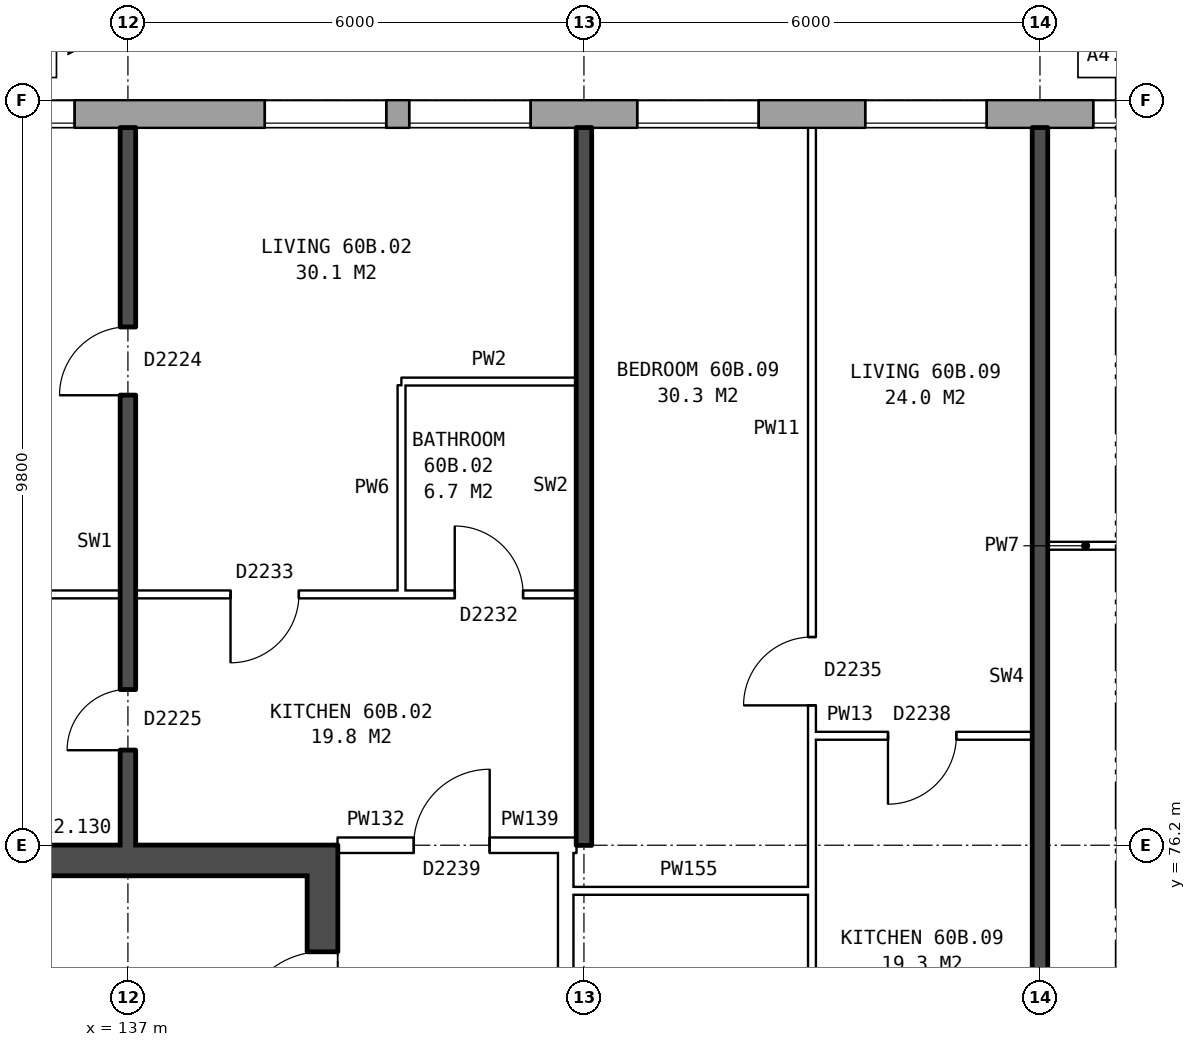
"""IFC4 building model, lengths in metres.
Left out: names, types, materials, properties, quantities, classifications, styles, units other than length and angle.
Written with IfcOpenShell. Run it as: python <this file> out.ifc"""

import sys

from ifc_helpers import new_model, si_unit, direction, frame, frame_2d, origin, place, context, subcontext, project, spatial, rectangle, extrude, element, fill, save


model = new_model("IFC4")
c1 = context("Model", 3, precision=1e-05, world=origin(), true_north=direction((0.0, 1.0)))
c2 = subcontext(c1, "Body", "Model", "MODEL_VIEW")
j1 = project(units=[si_unit("LENGTHUNIT", "METRE"), si_unit("PLANEANGLEUNIT", "RADIAN")], contexts=[c1])
p1 = place(None, origin())
s1 = spatial("IfcSite", under=j1, at=p1, CompositionType="ELEMENT")
p2 = place(p1, origin())
s2 = spatial("IfcBuilding", under=s1, at=p2, CompositionType="ELEMENT")
p3 = place(p2, frame((0.0, 0.0, 212.1)))
s3 = spatial("IfcBuildingStorey", under=s2, at=p3, CompositionType="ELEMENT", Elevation=212.1)
p4 = place(p3, frame((165.925, 85.82, 0.0), z_axis=(0.0, 0.0, 1.0), x_axis=(-1.0, 0.0, 0.0)))
e1 = element("IfcWall", 1, at=p4, inside=s3, PredefinedType="STANDARD", context=c2, shape_type="SweptSolid", body=[
    extrude(rectangle(XDim=33.875, YDim=0.36, at=frame_2d((16.938, 0.0))), origin(), (0.0, 0.0, 1.0), 2.85),
])
p5 = place(p4, frame((0.3, 0.0, 0.8)))
e2 = element("IfcOpeningElement", 2, at=p5, cuts=e1, PredefinedType="OPENING", context=c2, shape_type="SweptSolid", body=[
    extrude(rectangle(XDim=0.6, YDim=1.8, at=frame_2d((0.3, 0.9))), frame((0.0, 0.19, 0.0), z_axis=(0.0, -1.0, 0.0), x_axis=(1.0, 0.0, 0.0)), (0.0, 0.0, 1.0), 0.38),
])
p6 = place(p4, frame((5.625, 0.0, 0.8)))
e3 = element("IfcOpeningElement", 3, at=p6, cuts=e1, PredefinedType="OPENING", context=c2, shape_type="SweptSolid", body=[
    extrude(rectangle(XDim=1.6, YDim=1.8, at=frame_2d((0.8, 0.9))), frame((0.0, 0.19, 0.0), z_axis=(0.0, -1.0, 0.0), x_axis=(1.0, 0.0, 0.0)), (0.0, 0.0, 1.0), 0.38),
])
p7 = place(p4, frame((8.625, 0.0, 0.8)))
e4 = element("IfcOpeningElement", 4, at=p7, cuts=e1, PredefinedType="OPENING", context=c2, shape_type="SweptSolid", body=[
    extrude(rectangle(XDim=1.6, YDim=1.8, at=frame_2d((0.8, 0.9))), frame((0.0, 0.19, 0.0), z_axis=(0.0, -1.0, 0.0), x_axis=(1.0, 0.0, 0.0)), (0.0, 0.0, 1.0), 0.38),
])
p8 = place(p4, frame((11.625, 0.0, 0.8)))
e5 = element("IfcOpeningElement", 5, at=p8, cuts=e1, PredefinedType="OPENING", context=c2, shape_type="SweptSolid", body=[
    extrude(rectangle(XDim=1.6, YDim=1.8, at=frame_2d((0.8, 0.9))), frame((0.0, 0.19, 0.0), z_axis=(0.0, -1.0, 0.0), x_axis=(1.0, 0.0, 0.0)), (0.0, 0.0, 1.0), 0.38),
])
p9 = place(p4, frame((14.625, 0.0, 0.8)))
e6 = element("IfcOpeningElement", 6, at=p9, cuts=e1, PredefinedType="OPENING", context=c2, shape_type="SweptSolid", body=[
    extrude(rectangle(XDim=1.6, YDim=1.8, at=frame_2d((0.8, 0.9))), frame((0.0, 0.19, 0.0), z_axis=(0.0, -1.0, 0.0), x_axis=(1.0, 0.0, 0.0)), (0.0, 0.0, 1.0), 0.38),
])
p10 = place(p4, frame((17.625, 0.0, 0.8)))
e7 = element("IfcOpeningElement", 7, at=p10, cuts=e1, PredefinedType="OPENING", context=c2, shape_type="SweptSolid", body=[
    extrude(rectangle(XDim=1.6, YDim=1.8, at=frame_2d((0.8, 0.9))), frame((0.0, 0.19, 0.0), z_axis=(0.0, -1.0, 0.0), x_axis=(1.0, 0.0, 0.0)), (0.0, 0.0, 1.0), 0.38),
])
p11 = place(p4, frame((20.625, 0.0, 0.8)))
e8 = element("IfcOpeningElement", 8, at=p11, cuts=e1, PredefinedType="OPENING", context=c2, shape_type="SweptSolid", body=[
    extrude(rectangle(XDim=1.6, YDim=1.8, at=frame_2d((0.8, 0.9))), frame((0.0, 0.19, 0.0), z_axis=(0.0, -1.0, 0.0), x_axis=(1.0, 0.0, 0.0)), (0.0, 0.0, 1.0), 0.38),
])
p12 = place(p4, frame((23.625, 0.0, 0.8)))
e9 = element("IfcOpeningElement", 9, at=p12, cuts=e1, PredefinedType="OPENING", context=c2, shape_type="SweptSolid", body=[
    extrude(rectangle(XDim=1.6, YDim=1.8, at=frame_2d((0.8, 0.9))), frame((0.0, 0.19, 0.0), z_axis=(0.0, -1.0, 0.0), x_axis=(1.0, 0.0, 0.0)), (0.0, 0.0, 1.0), 0.38),
])
p13 = place(p4, frame((25.525, 0.0, 0.8)))
e10 = element("IfcOpeningElement", 10, at=p13, cuts=e1, PredefinedType="OPENING", context=c2, shape_type="SweptSolid", body=[
    extrude(rectangle(XDim=1.6, YDim=1.8, at=frame_2d((0.8, 0.9))), frame((0.0, 0.19, 0.0), z_axis=(0.0, -1.0, 0.0), x_axis=(1.0, 0.0, 0.0)), (0.0, 0.0, 1.0), 0.38),
])
p14 = place(p4, frame((29.625, 0.0, 0.8)))
e11 = element("IfcOpeningElement", 11, at=p14, cuts=e1, PredefinedType="OPENING", context=c2, shape_type="SweptSolid", body=[
    extrude(rectangle(XDim=1.6, YDim=1.8, at=frame_2d((0.8, 0.9))), frame((0.0, 0.19, 0.0), z_axis=(0.0, -1.0, 0.0), x_axis=(1.0, 0.0, 0.0)), (0.0, 0.0, 1.0), 0.38),
])
p15 = place(p4, frame((1.2, 0.0, 1.1)))
e12 = element("IfcOpeningElement", 12, at=p15, cuts=e1, PredefinedType="OPENING", context=c2, shape_type="SweptSolid", body=[
    extrude(rectangle(XDim=1.4, YDim=1.5, at=frame_2d((0.7, 0.75))), frame((0.0, 0.19, 0.0), z_axis=(0.0, -1.0, 0.0), x_axis=(1.0, 0.0, 0.0)), (0.0, 0.0, 1.0), 0.38),
])
p16 = place(p4, frame((4.05, 0.0, 0.8)))
e13 = element("IfcOpeningElement", 13, at=p16, cuts=e1, PredefinedType="OPENING", context=c2, shape_type="SweptSolid", body=[
    extrude(rectangle(XDim=0.6, YDim=0.9, at=frame_2d((0.3, 0.45))), frame((0.0, 0.19, 0.0), z_axis=(0.0, -1.0, 0.0), x_axis=(1.0, 0.0, 0.0)), (0.0, 0.0, 1.0), 0.38),
])
p17 = place(p3, frame((139.56, 63.8, 0.0), z_axis=(0.0, 0.0, 1.0), x_axis=(0.0, 1.0, 0.0)))
e14 = element("IfcWall", 14, at=p17, inside=s3, PredefinedType="SHEAR", context=c2, shape_type="SweptSolid", body=[
    extrude(rectangle(XDim=12.4, YDim=0.4, at=frame_2d((6.2, 0.0))), origin(), (0.0, 0.0, 1.0), 2.85),
])
p18 = place(p17, frame((1.325, 0.0, 0.0)))
e15 = element("IfcOpeningElement", 15, at=p18, cuts=e14, PredefinedType="OPENING", context=c2, shape_type="SweptSolid", body=[
    extrude(rectangle(XDim=1.1, YDim=2.1, at=frame_2d((0.55, 1.05))), frame((0.0, 0.21, 0.0), z_axis=(0.0, -1.0, 0.0), x_axis=(1.0, 0.0, 0.0)), (0.0, 0.0, 1.0), 0.42),
])
p19 = place(p17, frame((3.6, 0.0, 0.0)))
e16 = element("IfcOpeningElement", 16, at=p19, cuts=e14, PredefinedType="OPENING", context=c2, shape_type="SweptSolid", body=[
    extrude(rectangle(XDim=1.1, YDim=2.1, at=frame_2d((0.55, 1.05))), frame((0.0, 0.21, 0.0), z_axis=(0.0, -1.0, 0.0), x_axis=(1.0, 0.0, 0.0)), (0.0, 0.0, 1.0), 0.42),
])
p20 = place(p17, frame((5.8, 0.0, 0.0)))
e17 = element("IfcOpeningElement", 17, at=p20, cuts=e14, PredefinedType="OPENING", context=c2, shape_type="SweptSolid", body=[
    extrude(rectangle(XDim=1.1, YDim=2.1, at=frame_2d((0.55, 1.05))), frame((0.0, 0.21, 0.0), z_axis=(0.0, -1.0, 0.0), x_axis=(1.0, 0.0, 0.0)), (0.0, 0.0, 1.0), 0.42),
])
p21 = place(p17, frame((9.9, 0.0, 0.0)))
e18 = element("IfcOpeningElement", 18, at=p21, cuts=e14, PredefinedType="OPENING", context=c2, shape_type="SweptSolid", body=[
    extrude(rectangle(XDim=1.1, YDim=2.1, at=frame_2d((0.55, 1.05))), frame((0.0, 0.21, 0.0), z_axis=(0.0, -1.0, 0.0), x_axis=(1.0, 0.0, 0.0)), (0.0, 0.0, 1.0), 0.42),
])
p22 = place(p17, frame((8.125, 0.0, 0.0)))
e19 = element("IfcOpeningElement", 19, at=p22, cuts=e14, PredefinedType="OPENING", context=c2, shape_type="SweptSolid", body=[
    extrude(rectangle(XDim=0.85, YDim=2.1, at=frame_2d((0.425, 1.05))), frame((0.0, 0.21, 0.0), z_axis=(0.0, -1.0, 0.0), x_axis=(1.0, 0.0, 0.0)), (0.0, 0.0, 1.0), 0.42),
])
p23 = place(p3, frame((139.36, 76.0, 0.0), z_axis=(0.0, 0.0, 1.0), x_axis=(-1.0, 0.0, 0.0)))
e20 = element("IfcWall", 20, at=p23, inside=s3, PredefinedType="SHEAR", context=c2, shape_type="SweptSolid", body=[
    extrude(rectangle(XDim=7.6, YDim=0.4, at=frame_2d((3.8, 0.0))), origin(), (0.0, 0.0, 1.0), 2.85),
])
p24 = place(p3, frame((142.76, 63.9, 0.0), z_axis=(0.0, 0.0, 1.0), x_axis=(0.0, 1.0, 0.0)))
e21 = element("IfcWall", 21, at=p24, inside=s3, PredefinedType="PARTITIONING", context=c2, shape_type="SweptSolid", body=[
    extrude(rectangle(XDim=12.2, YDim=0.2, at=frame_2d((6.1, 0.0))), origin(), (0.0, 0.0, 1.0), 2.85),
])
p25 = place(p24, frame((5.1, 0.0, 0.0)))
e22 = element("IfcOpeningElement", 22, at=p25, cuts=e21, PredefinedType="OPENING", context=c2, shape_type="SweptSolid", body=[
    extrude(rectangle(XDim=2.0, YDim=2.1, at=frame_2d((1.0, 1.05))), frame((0.0, 0.11, 0.0), z_axis=(0.0, -1.0, 0.0), x_axis=(1.0, 0.0, 0.0)), (0.0, 0.0, 1.0), 0.22),
])
p26 = place(p3, frame((142.76, 75.6, 0.0), z_axis=(0.0, 0.0, 1.0), x_axis=(1.0, 0.0, 0.0)))
e23 = element("IfcWall", 23, at=p26, inside=s3, PredefinedType="PARTITIONING", context=c2, shape_type="SweptSolid", body=[
    extrude(rectangle(XDim=3.24, YDim=0.1, at=frame_2d((1.62, 0.0))), origin(), (0.0, 0.0, 1.0), 2.85),
])
p27 = place(p3, frame((139.76, 76.2, 0.0), z_axis=(0.0, 0.0, 1.0), x_axis=(1.0, 0.0, 0.0)))
e24 = element("IfcWall", 24, at=p27, inside=s3, PredefinedType="PARTITIONING", context=c2, shape_type="SweptSolid", body=[
    extrude(rectangle(XDim=3.0, YDim=0.2, at=frame_2d((1.5, 0.0))), origin(), (0.0, 0.0, 1.0), 2.85),
])
p28 = place(p27, frame((1.0, 0.0, 0.0)))
e25 = element("IfcOpeningElement", 25, at=p28, cuts=e24, PredefinedType="OPENING", context=c2, shape_type="SweptSolid", body=[
    extrude(rectangle(XDim=1.0, YDim=2.1, at=frame_2d((0.5, 1.05))), frame((0.0, 0.11, 0.0), z_axis=(0.0, -1.0, 0.0), x_axis=(1.0, 0.0, 0.0)), (0.0, 0.0, 1.0), 0.22),
])
p29 = place(p3, frame((142.76, 76.2, 0.0), z_axis=(0.0, 0.0, 1.0), x_axis=(1.0, 0.0, 0.0)))
e26 = element("IfcWall", 26, at=p29, inside=s3, PredefinedType="PARTITIONING", context=c2, shape_type="SweptSolid", body=[
    extrude(rectangle(XDim=0.14, YDim=0.2, at=frame_2d((0.07, 0.0))), origin(), (0.0, 0.0, 1.0), 2.85),
])
p30 = place(p3, frame((146.0, 77.64, 0.0), z_axis=(0.0, 0.0, 1.0), x_axis=(1.0, 0.0, 0.0)))
e27 = element("IfcWall", 27, at=p30, inside=s3, PredefinedType="PARTITIONING", context=c2, shape_type="SweptSolid", body=[
    extrude(rectangle(XDim=2.9, YDim=0.1, at=frame_2d((1.45, 0.0))), origin(), (0.0, 0.0, 1.0), 2.85),
])
p31 = place(p30, frame((1.0, 0.0, 0.0)))
e28 = element("IfcOpeningElement", 28, at=p31, cuts=e27, PredefinedType="OPENING", context=c2, shape_type="SweptSolid", body=[
    extrude(rectangle(XDim=0.9, YDim=2.1, at=frame_2d((0.45, 1.05))), frame((0.0, 0.06, 0.0), z_axis=(0.0, -1.0, 0.0), x_axis=(1.0, 0.0, 0.0)), (0.0, 0.0, 1.0), 0.12),
])
p32 = place(p3, frame((131.1, 79.5, 0.0), z_axis=(0.0, 0.0, 1.0), x_axis=(1.0, 0.0, 0.0)))
e29 = element("IfcWall", 29, at=p32, inside=s3, PredefinedType="PARTITIONING", context=c2, shape_type="SweptSolid", body=[
    extrude(rectangle(XDim=11.8, YDim=0.1, at=frame_2d((5.9, 0.0))), origin(), (0.0, 0.0, 1.0), 2.85),
])
p33 = place(p32, frame((7.25, 0.0, 0.0)))
e30 = element("IfcOpeningElement", 30, at=p33, cuts=e29, PredefinedType="OPENING", context=c2, shape_type="SweptSolid", body=[
    extrude(rectangle(XDim=0.9, YDim=2.1, at=frame_2d((0.45, 1.05))), frame((0.0, 0.06, 0.0), z_axis=(0.0, -1.0, 0.0), x_axis=(1.0, 0.0, 0.0)), (0.0, 0.0, 1.0), 0.12),
])
p34 = place(p32, frame((10.2, 0.0, 0.0)))
e31 = element("IfcOpeningElement", 31, at=p34, cuts=e29, PredefinedType="OPENING", context=c2, shape_type="SweptSolid", body=[
    extrude(rectangle(XDim=0.9, YDim=2.1, at=frame_2d((0.45, 1.05))), frame((0.0, 0.06, 0.0), z_axis=(0.0, -1.0, 0.0), x_axis=(1.0, 0.0, 0.0)), (0.0, 0.0, 1.0), 0.12),
])
p35 = place(p3, frame((149.1, 80.14, 0.0), z_axis=(0.0, 0.0, 1.0), x_axis=(1.0, 0.0, 0.0)))
e32 = element("IfcWall", 32, at=p35, inside=s3, PredefinedType="PARTITIONING", context=c2, shape_type="SweptSolid", body=[
    extrude(rectangle(XDim=2.9, YDim=0.1, at=frame_2d((1.45, 0.0))), origin(), (0.0, 0.0, 1.0), 2.85),
])
p36 = place(p35, frame((1.0, 0.0, 0.0)))
e33 = element("IfcOpeningElement", 33, at=p36, cuts=e32, PredefinedType="OPENING", context=c2, shape_type="SweptSolid", body=[
    extrude(rectangle(XDim=0.9, YDim=2.1, at=frame_2d((0.45, 1.05))), frame((0.0, 0.06, 0.0), z_axis=(0.0, -1.0, 0.0), x_axis=(1.0, 0.0, 0.0)), (0.0, 0.0, 1.0), 0.12),
])
p37 = place(p3, frame((140.6, 82.3, 0.0), z_axis=(0.0, 0.0, 1.0), x_axis=(1.0, 0.0, 0.0)))
e34 = element("IfcWall", 34, at=p37, inside=s3, PredefinedType="PARTITIONING", context=c2, shape_type="SweptSolid", body=[
    extrude(rectangle(XDim=2.3, YDim=0.1, at=frame_2d((1.15, 0.0))), origin(), (0.0, 0.0, 1.0), 2.85),
])
p38 = place(p3, frame((137.0, 76.2, 0.0), z_axis=(0.0, 0.0, 1.0), x_axis=(0.0, 1.0, 0.0)))
e35 = element("IfcWall", 35, at=p38, inside=s3, PredefinedType="SOLIDWALL", context=c2, shape_type="SweptSolid", body=[
    extrude(rectangle(XDim=9.44, YDim=0.2, at=frame_2d((4.72, 0.0))), origin(), (0.0, 0.0, 1.0), 2.85),
])
p39 = place(p38, frame((5.92, 0.0, 0.0)))
e36 = element("IfcOpeningElement", 36, at=p39, cuts=e35, PredefinedType="OPENING", context=c2, shape_type="SweptSolid", body=[
    extrude(rectangle(XDim=0.9, YDim=2.1, at=frame_2d((0.45, 1.05))), frame((0.0, 0.11, 0.0), z_axis=(0.0, -1.0, 0.0), x_axis=(1.0, 0.0, 0.0)), (0.0, 0.0, 1.0), 0.22),
])
p40 = place(p38, frame((1.25, 0.0, 0.0)))
e37 = element("IfcOpeningElement", 37, at=p40, cuts=e35, PredefinedType="OPENING", context=c2, shape_type="SweptSolid", body=[
    extrude(rectangle(XDim=0.8, YDim=2.1, at=frame_2d((0.4, 1.05))), frame((0.0, 0.11, 0.0), z_axis=(0.0, -1.0, 0.0), x_axis=(1.0, 0.0, 0.0)), (0.0, 0.0, 1.0), 0.22),
])
p41 = place(p3, frame((140.6, 79.55, 0.0), z_axis=(0.0, 0.0, 1.0), x_axis=(0.0, 1.0, 0.0)))
e38 = element("IfcWall", 38, at=p41, inside=s3, PredefinedType="PARTITIONING", context=c2, shape_type="SweptSolid", body=[
    extrude(rectangle(XDim=2.7, YDim=0.1, at=frame_2d((1.35, 0.0))), origin(), (0.0, 0.0, 1.0), 2.85),
])
p42 = place(p3, frame((143.0, 76.2, 0.0), z_axis=(0.0, 0.0, 1.0), x_axis=(0.0, 1.0, 0.0)))
e39 = element("IfcWall", 39, at=p42, inside=s3, PredefinedType="SOLIDWALL", context=c2, shape_type="SweptSolid", body=[
    extrude(rectangle(XDim=9.44, YDim=0.2, at=frame_2d((4.72, 0.0))), origin(), (0.0, 0.0, 1.0), 2.85),
])
p43 = place(p3, frame((146.0, 71.3, 0.0), z_axis=(0.0, 0.0, 1.0), x_axis=(0.0, 1.0, 0.0)))
e40 = element("IfcWall", 40, at=p43, inside=s3, PredefinedType="PARTITIONING", context=c2, shape_type="SweptSolid", body=[
    extrude(rectangle(XDim=14.34, YDim=0.1, at=frame_2d((7.17, 0.0))), origin(), (0.0, 0.0, 1.0), 2.85),
])
p44 = place(p43, frame((6.74, 0.0, 0.0)))
e41 = element("IfcOpeningElement", 41, at=p44, cuts=e40, PredefinedType="OPENING", context=c2, shape_type="SweptSolid", body=[
    extrude(rectangle(XDim=0.9, YDim=2.1, at=frame_2d((0.45, 1.05))), frame((0.0, 0.06, 0.0), z_axis=(0.0, -1.0, 0.0), x_axis=(1.0, 0.0, 0.0)), (0.0, 0.0, 1.0), 0.12),
])
p45 = place(p43, frame((0.4, 0.0, 0.0)))
e42 = element("IfcOpeningElement", 42, at=p45, cuts=e40, PredefinedType="OPENING", context=c2, shape_type="SweptSolid", body=[
    extrude(rectangle(XDim=0.9, YDim=2.1, at=frame_2d((0.45, 1.05))), frame((0.0, 0.06, 0.0), z_axis=(0.0, -1.0, 0.0), x_axis=(1.0, 0.0, 0.0)), (0.0, 0.0, 1.0), 0.12),
])
p46 = place(p3, frame((149.0, 71.2, 0.0), z_axis=(0.0, 0.0, 1.0), x_axis=(0.0, 1.0, 0.0)))
e43 = element("IfcWall", 43, at=p46, inside=s3, PredefinedType="SOLIDWALL", context=c2, shape_type="SweptSolid", body=[
    extrude(rectangle(XDim=14.44, YDim=0.2, at=frame_2d((7.22, 0.0))), origin(), (0.0, 0.0, 1.0), 2.85),
])
p47 = place(p9, origin())
e44 = element("IfcWindow", 44, at=p47, inside=s3, PartitioningType="SINGLE_PANEL", PredefinedType="WINDOW", context=c2, shape_type="SweptSolid", body=[
    extrude(rectangle(XDim=1.6, YDim=1.8, at=frame_2d((0.8, 0.9))), frame((0.0, 0.15, 0.0), z_axis=(0.0, -1.0, 0.0), x_axis=(1.0, 0.0, 0.0)), (0.0, 0.0, 1.0), 0.06),
])
fill(e6, e44)
p48 = place(p10, origin())
e45 = element("IfcWindow", 45, at=p48, inside=s3, PartitioningType="SINGLE_PANEL", PredefinedType="WINDOW", context=c2, shape_type="SweptSolid", body=[
    extrude(rectangle(XDim=1.6, YDim=1.8, at=frame_2d((0.8, 0.9))), frame((0.0, 0.15, 0.0), z_axis=(0.0, -1.0, 0.0), x_axis=(1.0, 0.0, 0.0)), (0.0, 0.0, 1.0), 0.06),
])
fill(e7, e45)
p49 = place(p11, origin())
e46 = element("IfcWindow", 46, at=p49, inside=s3, PartitioningType="SINGLE_PANEL", PredefinedType="WINDOW", context=c2, shape_type="SweptSolid", body=[
    extrude(rectangle(XDim=1.6, YDim=1.8, at=frame_2d((0.8, 0.9))), frame((0.0, 0.15, 0.0), z_axis=(0.0, -1.0, 0.0), x_axis=(1.0, 0.0, 0.0)), (0.0, 0.0, 1.0), 0.06),
])
fill(e8, e46)
p50 = place(p12, origin())
e47 = element("IfcWindow", 47, at=p50, inside=s3, PartitioningType="SINGLE_PANEL", PredefinedType="WINDOW", context=c2, shape_type="SweptSolid", body=[
    extrude(rectangle(XDim=1.6, YDim=1.8, at=frame_2d((0.8, 0.9))), frame((0.0, 0.15, 0.0), z_axis=(0.0, -1.0, 0.0), x_axis=(1.0, 0.0, 0.0)), (0.0, 0.0, 1.0), 0.06),
])
fill(e9, e47)
p51 = place(p13, origin())
e48 = element("IfcWindow", 48, at=p51, inside=s3, PartitioningType="SINGLE_PANEL", PredefinedType="WINDOW", context=c2, shape_type="SweptSolid", body=[
    extrude(rectangle(XDim=1.6, YDim=1.8, at=frame_2d((0.8, 0.9))), frame((0.0, 0.15, 0.0), z_axis=(0.0, -1.0, 0.0), x_axis=(1.0, 0.0, 0.0)), (0.0, 0.0, 1.0), 0.06),
])
fill(e10, e48)
p52 = place(p14, origin())
e49 = element("IfcWindow", 49, at=p52, inside=s3, PartitioningType="SINGLE_PANEL", PredefinedType="WINDOW", context=c2, shape_type="SweptSolid", body=[
    extrude(rectangle(XDim=1.6, YDim=1.8, at=frame_2d((0.8, 0.9))), frame((0.0, 0.15, 0.0), z_axis=(0.0, -1.0, 0.0), x_axis=(1.0, 0.0, 0.0)), (0.0, 0.0, 1.0), 0.06),
])
fill(e11, e49)
p53 = place(p21, origin())
e50 = element("IfcDoor", 50, at=p53, inside=s3, OperationType="SINGLE_SWING_LEFT", PredefinedType="DOOR", context=c2, shape_type="SweptSolid", body=[
    extrude(rectangle(XDim=1.1, YDim=2.1, at=frame_2d((0.55, 1.05))), frame((0.0, 0.185, 0.0), z_axis=(0.0, -1.0, 0.0), x_axis=(1.0, 0.0, 0.0)), (0.0, 0.0, 1.0), 0.05),
])
fill(e18, e50)
p54 = place(p39, origin())
e51 = element("IfcDoor", 51, at=p54, inside=s3, OperationType="SINGLE_SWING_LEFT", PredefinedType="DOOR", context=c2, shape_type="SweptSolid", body=[
    extrude(rectangle(XDim=0.9, YDim=2.1, at=frame_2d((0.45, 1.05))), frame((0.0, 0.025, 0.0), z_axis=(0.0, -1.0, 0.0), x_axis=(1.0, 0.0, 0.0)), (0.0, 0.0, 1.0), 0.05),
])
fill(e36, e51)
p55 = place(p28, origin())
e52 = element("IfcDoor", 52, at=p55, inside=s3, OperationType="SINGLE_SWING_RIGHT", PredefinedType="DOOR", context=c2, shape_type="SweptSolid", body=[
    extrude(rectangle(XDim=1.0, YDim=2.1, at=frame_2d((0.5, 1.05))), frame((0.0, 0.025, 0.0), z_axis=(0.0, -1.0, 0.0), x_axis=(1.0, 0.0, 0.0)), (0.0, 0.0, 1.0), 0.05),
])
fill(e25, e52)
p56 = place(p33, frame((0.9, 0.0, 0.0), z_axis=(0.0, 0.0, 1.0), x_axis=(-1.0, 0.0, 0.0)))
e53 = element("IfcDoor", 53, at=p56, inside=s3, OperationType="SINGLE_SWING_RIGHT", PredefinedType="DOOR", context=c2, shape_type="SweptSolid", body=[
    extrude(rectangle(XDim=0.9, YDim=2.1, at=frame_2d((0.45, 1.05))), frame((0.0, 0.025, 0.0), z_axis=(0.0, -1.0, 0.0), x_axis=(1.0, 0.0, 0.0)), (0.0, 0.0, 1.0), 0.05),
])
fill(e30, e53)
p57 = place(p40, origin())
e54 = element("IfcDoor", 54, at=p57, inside=s3, OperationType="SINGLE_SWING_LEFT", PredefinedType="DOOR", context=c2, shape_type="SweptSolid", body=[
    extrude(rectangle(XDim=0.8, YDim=2.1, at=frame_2d((0.4, 1.05))), frame((0.0, 0.025, 0.0), z_axis=(0.0, -1.0, 0.0), x_axis=(1.0, 0.0, 0.0)), (0.0, 0.0, 1.0), 0.05),
])
fill(e37, e54)
p58 = place(p34, origin())
e55 = element("IfcDoor", 55, at=p58, inside=s3, OperationType="SINGLE_SWING_LEFT", PredefinedType="DOOR", context=c2, shape_type="SweptSolid", body=[
    extrude(rectangle(XDim=0.9, YDim=2.1, at=frame_2d((0.45, 1.05))), frame((0.0, 0.025, 0.0), z_axis=(0.0, -1.0, 0.0), x_axis=(1.0, 0.0, 0.0)), (0.0, 0.0, 1.0), 0.05),
])
fill(e31, e55)
p59 = place(p44, origin())
e56 = element("IfcDoor", 56, at=p59, inside=s3, OperationType="SINGLE_SWING_LEFT", PredefinedType="DOOR", context=c2, shape_type="SweptSolid", body=[
    extrude(rectangle(XDim=0.9, YDim=2.1, at=frame_2d((0.45, 1.05))), frame((0.0, 0.025, 0.0), z_axis=(0.0, -1.0, 0.0), x_axis=(1.0, 0.0, 0.0)), (0.0, 0.0, 1.0), 0.05),
])
fill(e41, e56)
p60 = place(p31, frame((0.9, 0.0, 0.0), z_axis=(0.0, 0.0, 1.0), x_axis=(-1.0, 0.0, 0.0)))
e57 = element("IfcDoor", 57, at=p60, inside=s3, OperationType="SINGLE_SWING_RIGHT", PredefinedType="DOOR", context=c2, shape_type="SweptSolid", body=[
    extrude(rectangle(XDim=0.9, YDim=2.1, at=frame_2d((0.45, 1.05))), frame((0.0, 0.025, 0.0), z_axis=(0.0, -1.0, 0.0), x_axis=(1.0, 0.0, 0.0)), (0.0, 0.0, 1.0), 0.05),
])
fill(e28, e57)
save(model, sys.argv[1])
